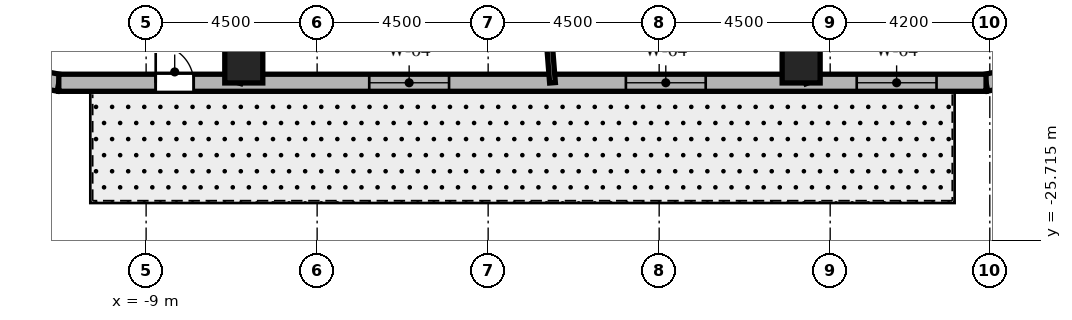
"""IFC4 building model, lengths in metres.
Left out: names, types, materials, properties, quantities, classifications, styles, units other than length and angle.
Written with IfcOpenShell. Run it as: python <this file> out.ifc"""

import sys

from ifc_helpers import new_model, si_unit, direction, frame, frame_2d, origin, origin_2d, place, context, subcontext, project, spatial, rectangle, extrude, element, fill, save


model = new_model("IFC4")
c1 = context("Model", 3, precision=1e-05, world=origin(), true_north=direction((0.0, 1.0)))
c2 = subcontext(c1, "Body", "Model", "MODEL_VIEW")
j1 = project(units=[si_unit("LENGTHUNIT", "METRE"), si_unit("PLANEANGLEUNIT", "RADIAN")], contexts=[c1])
p1 = place(None, origin())
s1 = spatial("IfcSite", under=j1, at=p1, CompositionType="ELEMENT")
p2 = place(p1, origin())
s2 = spatial("IfcBuilding", under=s1, at=p2, CompositionType="ELEMENT")
p3 = place(p2, frame((0.0, 0.0, 252.1)))
s3 = spatial("IfcBuildingStorey", under=s2, at=p3, CompositionType="ELEMENT", Elevation=252.1)
for number, where, z_axis, x_axis in (
    (1, (-6.43, -21.08, 0.0), (0.0, 0.0, 1.0), (1.0, 0.0, 0.0)),
    (2, (8.236, -21.08, 0.0), (0.0, 0.0, 1.0), (1.0, 0.0, 0.0)),
):
    element("IfcColumn", number, at=place(p3, frame(where, z_axis=z_axis, x_axis=x_axis)), inside=s3, PredefinedType="COLUMN", context=c2, shape_type="SweptSolid", body=[
        extrude(rectangle(XDim=1.0, YDim=1.0, at=origin_2d()), origin(), (0.0, 0.0, 1.0), 3.8),
    ])
p4 = place(p3, frame((-12.546, -21.34, 0.0), z_axis=(0.0, 0.0, 1.0), x_axis=(0.982686750835, -0.18527479519, 0.0)))
e3 = element("IfcWall", 3, at=p4, inside=s3, PredefinedType="SOLIDWALL", context=c2, shape_type="SweptSolid", body=[
    extrude(rectangle(XDim=1.27, YDim=0.45, at=frame_2d((0.635, 0.0))), origin(), (0.0, 0.0, 1.0), 3.48),
])
p5 = place(p3, frame((13.102, -21.575, 0.0), z_axis=(0.0, 0.0, 1.0), x_axis=(0.978757421505, 0.205021730188, 0.0)))
e4 = element("IfcWall", 4, at=p5, inside=s3, PredefinedType="SOLIDWALL", context=c2, shape_type="SweptSolid", body=[
    extrude(rectangle(XDim=1.406, YDim=0.45, at=frame_2d((0.703, 0.0))), origin(), (0.0, 0.0, 1.0), 3.48),
])
p6 = place(p3, frame((-11.298, -21.575, 0.0), z_axis=(0.0, 0.0, 1.0), x_axis=(1.0, 0.0, 0.0)))
e5 = element("IfcWall", 5, at=p6, inside=s3, PredefinedType="SOLIDWALL", context=c2, shape_type="SweptSolid", body=[
    extrude(rectangle(XDim=24.399, YDim=0.45, at=frame_2d((12.2, 0.0))), origin(), (0.0, 0.0, 1.0), 3.48),
])
p7 = place(p6, frame((2.55, 0.0, 0.0)))
e6 = element("IfcOpeningElement", 6, at=p7, cuts=e5, PredefinedType="OPENING", context=c2, shape_type="SweptSolid", body=[
    extrude(rectangle(XDim=1.0, YDim=2.15, at=frame_2d((0.5, 1.075))), frame((0.0, 0.235, 0.0), z_axis=(0.0, -1.0, 0.0), x_axis=(1.0, 0.0, 0.0)), (0.0, 0.0, 1.0), 0.47),
])
p8 = place(p6, frame((8.169, 0.0, 0.8)))
e7 = element("IfcOpeningElement", 7, at=p8, cuts=e5, PredefinedType="OPENING", context=c2, shape_type="SweptSolid", body=[
    extrude(rectangle(XDim=2.1, YDim=1.85, at=frame_2d((1.05, 0.925))), frame((0.0, 0.235, 0.0), z_axis=(0.0, -1.0, 0.0), x_axis=(1.0, 0.0, 0.0)), (0.0, 0.0, 1.0), 0.47),
])
p9 = place(p6, frame((14.922, 0.0, 0.8)))
e8 = element("IfcOpeningElement", 8, at=p9, cuts=e5, PredefinedType="OPENING", context=c2, shape_type="SweptSolid", body=[
    extrude(rectangle(XDim=2.1, YDim=1.85, at=frame_2d((1.05, 0.925))), frame((0.0, 0.235, 0.0), z_axis=(0.0, -1.0, 0.0), x_axis=(1.0, 0.0, 0.0)), (0.0, 0.0, 1.0), 0.47),
])
p10 = place(p6, frame((20.996, 0.0, 0.8)))
e9 = element("IfcOpeningElement", 9, at=p10, cuts=e5, PredefinedType="OPENING", context=c2, shape_type="SweptSolid", body=[
    extrude(rectangle(XDim=2.1, YDim=1.85, at=frame_2d((1.05, 0.925))), frame((0.0, 0.235, 0.0), z_axis=(0.0, -1.0, 0.0), x_axis=(1.0, 0.0, 0.0)), (0.0, 0.0, 1.0), 0.47),
])
p11 = place(p3, frame((-3.004, -9.85, 0.0), z_axis=(0.0, 0.0, 1.0), x_axis=(-0.291775760688, -0.956486751333, 0.0)))
e10 = element("IfcWall", 10, at=p11, inside=s3, PredefinedType="PARTITIONING", context=c2, shape_type="SweptSolid", body=[
    extrude(rectangle(XDim=12.258, YDim=0.15, at=frame_2d((6.129, 0.0))), origin(), (0.0, 0.0, 1.0), 2.72),
])
p12 = place(p3, frame((1.1, -14.018, 0.0), z_axis=(0.0, 0.0, 1.0), x_axis=(0.078228275349, -0.996935472804, 0.0)))
e11 = element("IfcWall", 11, at=p12, inside=s3, PredefinedType="PARTITIONING", context=c2, shape_type="SweptSolid", body=[
    extrude(rectangle(XDim=7.581, YDim=0.15, at=frame_2d((3.79, 0.0))), origin(), (0.0, 0.0, 1.0), 2.72),
])
p13 = place(p3, frame((3.848, -9.85, 0.0), z_axis=(0.0, 0.0, 1.0), x_axis=(0.363921778212, -0.931429513889, 0.0)))
e12 = element("IfcWall", 12, at=p13, inside=s3, PredefinedType="PARTITIONING", context=c2, shape_type="SweptSolid", body=[
    extrude(rectangle(XDim=12.588, YDim=0.15, at=frame_2d((6.294, 0.0))), origin(), (0.0, 0.0, 1.0), 2.72),
])
p14 = place(p7, origin())
e13 = element("IfcDoor", 13, at=p14, inside=s3, OperationType="SINGLE_SWING_LEFT", PredefinedType="DOOR", context=c2, shape_type="SweptSolid", body=[
    extrude(rectangle(XDim=1.0, YDim=2.15, at=frame_2d((0.5, 1.075))), frame((0.0, 0.025, 0.0), z_axis=(0.0, -1.0, 0.0), x_axis=(1.0, 0.0, 0.0)), (0.0, 0.0, 1.0), 0.05),
])
fill(e6, e13)
p15 = place(p8, origin())
e14 = element("IfcWindow", 14, at=p15, inside=s3, PartitioningType="SINGLE_PANEL", PredefinedType="WINDOW", context=c2, shape_type="SweptSolid", body=[
    extrude(rectangle(XDim=2.1, YDim=1.85, at=frame_2d((1.05, 0.925))), frame((0.0, 0.03, 0.0), z_axis=(0.0, -1.0, 0.0), x_axis=(1.0, 0.0, 0.0)), (0.0, 0.0, 1.0), 0.06),
])
fill(e7, e14)
p16 = place(p9, origin())
e15 = element("IfcWindow", 15, at=p16, inside=s3, PartitioningType="SINGLE_PANEL", PredefinedType="WINDOW", context=c2, shape_type="SweptSolid", body=[
    extrude(rectangle(XDim=2.1, YDim=1.85, at=frame_2d((1.05, 0.925))), frame((0.0, 0.03, 0.0), z_axis=(0.0, -1.0, 0.0), x_axis=(1.0, 0.0, 0.0)), (0.0, 0.0, 1.0), 0.06),
])
fill(e8, e15)
p17 = place(p10, origin())
e16 = element("IfcWindow", 16, at=p17, inside=s3, PartitioningType="SINGLE_PANEL", PredefinedType="WINDOW", context=c2, shape_type="SweptSolid", body=[
    extrude(rectangle(XDim=2.1, YDim=1.85, at=frame_2d((1.05, 0.925))), frame((0.0, 0.03, 0.0), z_axis=(0.0, -1.0, 0.0), x_axis=(1.0, 0.0, 0.0)), (0.0, 0.0, 1.0), 0.06),
])
fill(e9, e16)
save(model, sys.argv[1])
